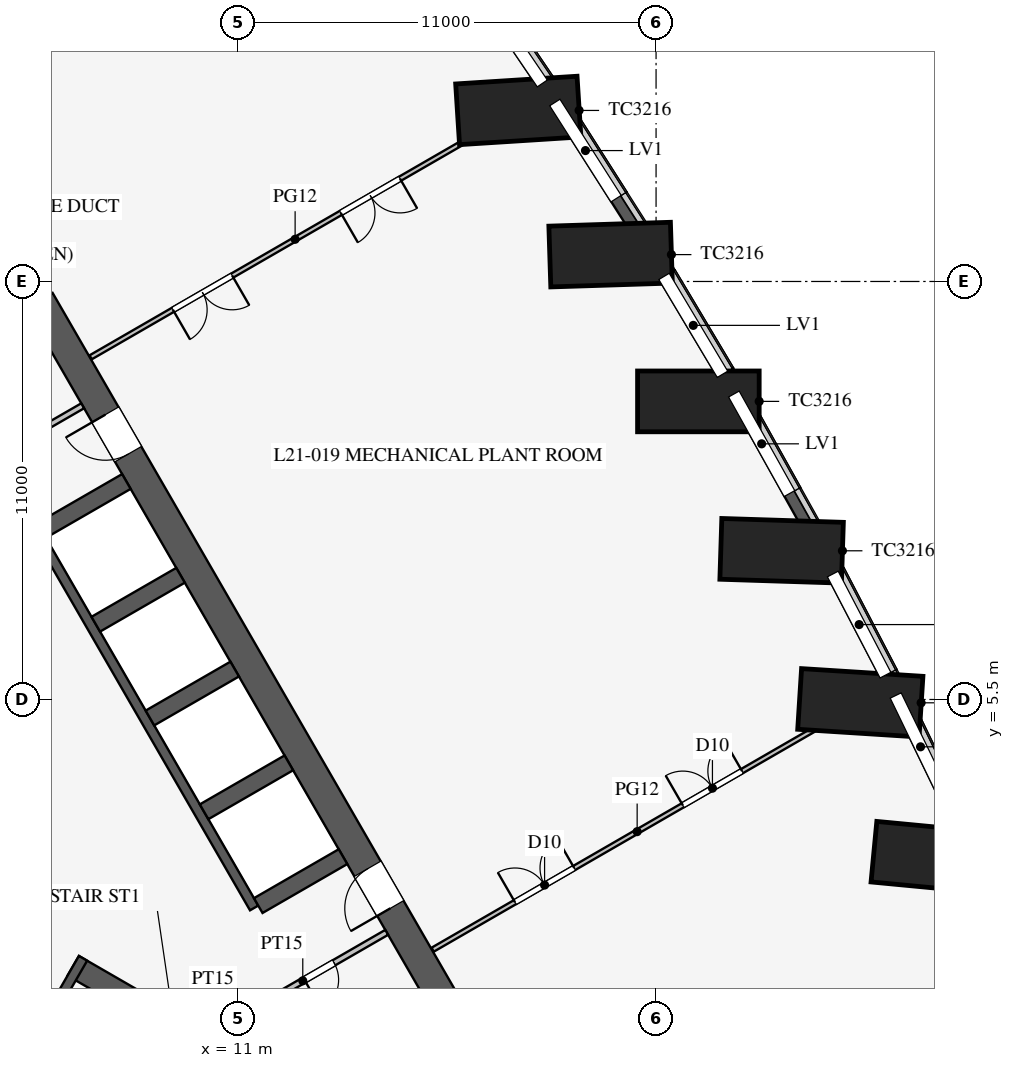
"""IFC4 building model, lengths in metres.
Left out: names, types, materials, properties, quantities, classifications, styles, units other than length and angle.
Written with IfcOpenShell. Run it as: python <this file> out.ifc"""

import sys

from ifc_helpers import new_model, si_unit, direction, frame, frame_2d, origin, origin_2d, place, context, subcontext, project, spatial, polyline, rectangle, outline, extrude, clip, halfspace, element, fill, save


model = new_model("IFC4")
c1 = context("Model", 3, precision=1e-05, world=origin(), true_north=direction((0.0, 1.0)))
c2 = subcontext(c1, "Body", "Model", "MODEL_VIEW")
j1 = project(units=[si_unit("LENGTHUNIT", "METRE"), si_unit("PLANEANGLEUNIT", "RADIAN")], contexts=[c1])
p1 = place(None, origin())
s1 = spatial("IfcSite", under=j1, at=p1, CompositionType="ELEMENT")
p2 = place(p1, origin())
s2 = spatial("IfcBuilding", under=s1, at=p2, CompositionType="ELEMENT")
p3 = place(p2, frame((0.0, 0.0, 92.1)))
s3 = spatial("IfcBuildingStorey", under=s2, at=p3, CompositionType="ELEMENT", Elevation=92.1)
p4 = place(p3, frame((31.426, -2.641, 0.0), z_axis=(-0.217636836674, -0.125674836379, 0.967904976133), x_axis=(-0.390430392584, 0.920087338943, 0.031676446499)))
e1 = element("IfcColumn", 1, at=p4, inside=s3, PredefinedType="COLUMN", context=c2, shape_type="Clipping", body=[
    clip(clip(extrude(rectangle(XDim=3.2, YDim=1.6, at=origin_2d()), origin(), (0.0, 0.0, 1.0), 6.199), halfspace(frame((0.0, 0.0, 0.259), z_axis=(1.6119245002534085e-05, 2.5335897412520618e-05, 0.9999999995491311), x_axis=(0.0, 0.9999999996790462, -2.5335897415812134e-05)), True)), halfspace(frame((0.0, 0.0, 5.939), z_axis=(-1.6119245002534085e-05, -2.5335897412520618e-05, -0.9999999995491311), x_axis=(0.0, -0.9999999996790462, 2.5335897415812134e-05)), True)),
])
p5 = place(p3, frame((29.576, 1.487, 0.0), z_axis=(-0.20262976704, -0.116980910023, 0.972243099332), x_axis=(-0.417791222298, 0.908271551682, 0.022209974679)))
e2 = element("IfcColumn", 2, at=p5, inside=s3, PredefinedType="COLUMN", context=c2, shape_type="Clipping", body=[
    clip(clip(extrude(rectangle(XDim=3.2, YDim=1.6, at=origin_2d()), origin(), (0.0, 0.0, 1.0), 6.171), halfspace(frame((0.0, 0.0, 0.229), z_axis=(-6.181182433073058e-06, -3.065069579338831e-06, 0.9999999999761991), x_axis=(0.0, 0.9999999999953028, 3.0650695793973846e-06)), True)), halfspace(frame((0.0, 0.0, 5.942), z_axis=(6.181182433073058e-06, 3.065069579338831e-06, -0.9999999999761991), x_axis=(0.0, -0.9999999999953028, -3.0650695793973846e-06)), True)),
])
p6 = place(p3, frame((27.611, 5.549, 0.0), z_axis=(-0.191886340443, -0.110783015409, 0.975144479474), x_axis=(-0.445390477365, 0.895226011395, 0.014060981253)))
e3 = element("IfcColumn", 3, at=p6, inside=s3, PredefinedType="COLUMN", context=c2, shape_type="Clipping", body=[
    clip(clip(extrude(rectangle(XDim=3.2, YDim=1.6, at=origin_2d()), origin(), (0.0, 0.0, 1.0), 6.153), halfspace(frame((0.0, 0.0, 0.205), z_axis=(-8.069350751413462e-07, -2.2984768012629386e-05, 0.9999999997355247), x_axis=(0.0, 0.9999999997358503, 2.298476801263687e-05)), True)), halfspace(frame((0.0, 0.0, 5.947), z_axis=(8.069350751413462e-07, 2.2984768012629386e-05, -0.9999999997355247), x_axis=(0.0, -0.9999999997358503, -2.298476801263687e-05)), True)),
])
p7 = place(p3, frame((25.531, 9.544, 0.0), z_axis=(-0.185417945913, -0.107037626655, 0.976812741427), x_axis=(-0.472814137091, 0.881135911226, 0.006804242326)))
e4 = element("IfcColumn", 4, at=p7, inside=s3, PredefinedType="COLUMN", context=c2, shape_type="Clipping", body=[
    clip(clip(extrude(rectangle(XDim=3.2, YDim=1.6, at=origin_2d()), origin(), (0.0, 0.0, 1.0), 6.142), halfspace(frame((0.0, 0.0, 0.187), z_axis=(-1.1482898320344485e-05, -6.019683504304707e-06, 0.9999999999159532), x_axis=(0.0, 0.9999999999818817, 6.019683504701576e-06)), True)), halfspace(frame((0.0, 0.0, 5.955), z_axis=(1.1482898320344485e-05, 6.019683504304707e-06, -0.9999999999159532), x_axis=(0.0, -0.9999999999818817, -6.019683504701576e-06)), True)),
])
p8 = place(p3, frame((23.338, 13.474, 0.0), z_axis=(-0.183254498096, -0.105784931626, 0.977357323177), x_axis=(-0.499939380126, 0.866060399857, 0.0)))
e5 = element("IfcColumn", 5, at=p8, inside=s3, PredefinedType="COLUMN", context=c2, shape_type="Clipping", body=[
    clip(clip(extrude(rectangle(XDim=3.2, YDim=1.6, at=origin_2d()), origin(), (0.0, 0.0, 1.0), 6.139), halfspace(frame((0.0, 0.0, 0.174), z_axis=(-1.4810932677108633e-05, 8.35661905923546e-06, 0.9999999998554017), x_axis=(0.0, 0.9999999999650835, -8.356619060152029e-06)), True)), halfspace(frame((0.0, 0.0, 5.965), z_axis=(1.4810932677108633e-05, -8.35661905923546e-06, -0.9999999998554017), x_axis=(0.0, -0.9999999999650835, 8.356619060152029e-06)), True)),
])
p9 = place(p3, frame((21.031, 17.339, 0.0), z_axis=(-0.185417945913, -0.107037626655, 0.976812741427), x_axis=(-0.526586350374, 0.850094417042, -0.006804242326)))
e6 = element("IfcColumn", 6, at=p9, inside=s3, PredefinedType="COLUMN", context=c2, shape_type="Clipping", body=[
    clip(clip(extrude(rectangle(XDim=3.2, YDim=1.6, at=origin_2d()), origin(), (0.0, 0.0, 1.0), 6.142), halfspace(frame((0.0, 0.0, 0.187), z_axis=(-1.1842135642686942e-05, -5.278007838949161e-06, 0.9999999999159532), x_axis=(0.0, 0.9999999999860714, 5.278007839319245e-06)), True)), halfspace(frame((0.0, 0.0, 5.955), z_axis=(1.1842135642686942e-05, 5.278007838949161e-06, -0.9999999999159532), x_axis=(0.0, -0.9999999999860714, -5.278007839319245e-06)), True)),
])
p10 = place(p3, frame((18.611, 21.137, 0.0), z_axis=(-0.191886340443, -0.110783015409, 0.975144479474), x_axis=(-0.552576194945, 0.833343769153, -0.014060981253)))
e7 = element("IfcColumn", 7, at=p10, inside=s3, PredefinedType="COLUMN", context=c2, shape_type="Clipping", body=[
    clip(clip(extrude(rectangle(XDim=3.2, YDim=1.6, at=origin_2d()), origin(), (0.0, 0.0, 1.0), 6.153), halfspace(frame((0.0, 0.0, 0.205), z_axis=(-3.711813696356814e-06, -2.269742593100088e-05, 0.9999999997355247), x_axis=(0.0, 0.9999999997424135, 2.269742593115724e-05)), True)), halfspace(frame((0.0, 0.0, 5.947), z_axis=(3.711813696356814e-06, 2.269742593100088e-05, -0.9999999997355247), x_axis=(0.0, -0.9999999997424135, -2.269742593115724e-05)), True)),
])
p11 = place(p3, frame((16.076, 24.87, 0.0), z_axis=(-0.20262976704, -0.116980910023, 0.972243099332), x_axis=(-0.577645682079, 0.81598540612, -0.022209974679)))
e8 = element("IfcColumn", 8, at=p11, inside=s3, PredefinedType="COLUMN", context=c2, shape_type="Clipping", body=[
    clip(clip(extrude(rectangle(XDim=3.2, YDim=1.6, at=origin_2d()), origin(), (0.0, 0.0, 1.0), 6.171), halfspace(frame((0.0, 0.0, 0.229), z_axis=(-6.6490654311614225e-06, -1.841628814169827e-06, 0.9999999999761991), x_axis=(0.0, 0.9999999999983042, 1.8416288142105364e-06)), True)), halfspace(frame((0.0, 0.0, 5.942), z_axis=(6.6490654311614225e-06, 1.841628814169827e-06, -0.9999999999761991), x_axis=(0.0, -0.9999999999983042, -1.8416288142105364e-06)), True)),
])
p12 = place(p3, frame((16.743, -3.0, 0.0), z_axis=(0.0, 0.0, 1.0), x_axis=(-0.500002442456, 0.866023993627, 0.0)))
e9 = element("IfcWall", 9, at=p12, inside=s3, PredefinedType="SHEAR", context=c2, shape_type="SweptSolid", body=[
    extrude(rectangle(XDim=21.939, YDim=0.8, at=frame_2d((10.97, 0.0))), origin(), (0.0, 0.0, 1.0), 6.0),
])
p13 = place(p12, frame((17.27, 0.0, 0.0)))
e10 = element("IfcOpeningElement", 10, at=p13, cuts=e9, PredefinedType="OPENING", context=c2, shape_type="SweptSolid", body=[
    extrude(rectangle(XDim=1.2, YDim=2.1, at=frame_2d((0.6, 1.05))), frame((0.0, 0.41, 0.0), z_axis=(0.0, -1.0, 0.0), x_axis=(1.0, 0.0, 0.0)), (0.0, 0.0, 1.0), 0.82),
])
p14 = place(p12, frame((3.47, 0.0, 0.0)))
e11 = element("IfcOpeningElement", 11, at=p14, cuts=e9, PredefinedType="OPENING", context=c2, shape_type="SweptSolid", body=[
    extrude(rectangle(XDim=1.2, YDim=2.1, at=frame_2d((0.6, 1.05))), frame((0.0, 0.41, 0.0), z_axis=(0.0, -1.0, 0.0), x_axis=(1.0, 0.0, 0.0)), (0.0, 0.0, 1.0), 0.82),
])
p15 = place(p3, frame((11.424, 0.014, 0.0), z_axis=(0.0, 0.0, 1.0), x_axis=(-0.500001763848, 0.866024385424, 0.0)))
e12 = element("IfcWall", 12, at=p15, inside=s3, PredefinedType="SHEAR", context=c2, shape_type="SweptSolid", body=[
    extrude(rectangle(XDim=11.4, YDim=0.25, at=frame_2d((5.7, 0.0))), origin(), (0.0, 0.0, 1.0), 6.0),
])
for number, where, z_axis, x_axis in (
    (13, (11.532, 0.076, 0.0), (0.0, 0.0, 1.0), (0.866, 0.5, 0.0)),
    (14, (10.107, 2.544, 0.0), (0.0, 0.0, 1.0), (0.866, 0.5, 0.0)),
    (15, (8.682, 5.012, 0.0), (0.0, 0.0, 1.0), (0.866, 0.5, 0.0)),
    (16, (7.257, 7.481, 0.0), (0.0, 0.0, 1.0), (0.866, 0.5, 0.0)),
):
    element("IfcWall", number, at=place(p3, frame(where, z_axis=z_axis, x_axis=x_axis)), inside=s3, PredefinedType="SHEAR", context=c2, shape_type="SweptSolid", body=[
        extrude(rectangle(XDim=2.575, YDim=0.45, at=frame_2d((1.288, 0.0))), origin(), (0.0, 0.0, 1.0), 6.0),
    ])
p16 = place(p3, frame((5.832, 9.949, 0.0), z_axis=(0.0, 0.0, 1.0), x_axis=(0.866029291668, 0.499993265928, 0.0)))
e17 = element("IfcWall", 17, at=p16, inside=s3, PredefinedType="SHEAR", context=c2, shape_type="SweptSolid", body=[
    extrude(rectangle(XDim=2.575, YDim=0.45, at=frame_2d((1.288, 0.0))), origin(), (0.0, 0.0, 1.0), 6.0),
])
p17 = place(p3, frame((6.663, -1.509, 0.0), z_axis=(0.0, 0.0, 1.0), x_axis=(0.866019375473, -0.500010441196, 0.0)))
e18 = element("IfcWall", 18, at=p17, inside=s3, PredefinedType="SHEAR", context=c2, shape_type="SweptSolid", body=[
    extrude(rectangle(XDim=9.075, YDim=0.6, at=frame_2d((4.538, 0.0))), origin(), (0.0, 0.0, 1.0), 6.0),
])
p18 = place(p3, frame((4.597, -5.339, 0.0), z_axis=(0.0, 0.0, 1.0), x_axis=(0.499984536904, 0.866034331223, 0.0)))
e19 = element("IfcWall", 19, at=p18, inside=s3, PredefinedType="SHEAR", context=c2, shape_type="SweptSolid", body=[
    extrude(rectangle(XDim=4.65, YDim=0.25, at=frame_2d((2.325, 0.0))), origin(), (0.0, 0.0, 1.0), 6.0),
])
p19 = place(p18, frame((1.525, 0.0, 0.0)))
e20 = element("IfcOpeningElement", 20, at=p19, cuts=e19, PredefinedType="OPENING", context=c2, shape_type="SweptSolid", body=[
    extrude(rectangle(XDim=1.6, YDim=2.1, at=frame_2d((0.8, 1.05))), frame((0.0, 0.135, 0.0), z_axis=(0.0, -1.0, 0.0), x_axis=(1.0, 0.0, 0.0)), (0.0, 0.0, 1.0), 0.27),
])
p20 = place(p3, frame((30.141, 1.814, 0.0), z_axis=(0.0, 0.0, 1.0), x_axis=(-0.435857917556, 0.900015486369, 0.0)))
e21 = element("IfcWall", 21, at=p20, inside=s3, PredefinedType="SOLIDWALL", context=c2, shape_type="SweptSolid", body=[
    extrude(rectangle(XDim=4.512, YDim=0.3, at=frame_2d((2.256, 0.0))), origin(), (0.0, 0.0, 1.0), 5.8),
])
p21 = place(p20, frame((1.212, 0.0, 3.5)))
e22 = element("IfcOpeningElement", 22, at=p21, cuts=e21, PredefinedType="OPENING", context=c2, shape_type="SweptSolid", body=[
    extrude(rectangle(XDim=3.0, YDim=2.0, at=frame_2d((1.5, 1.0))), frame((0.0, 0.16, 0.0), z_axis=(0.0, -1.0, 0.0), x_axis=(1.0, 0.0, 0.0)), (0.0, 0.0, 1.0), 0.32),
])
p22 = place(p3, frame((28.175, 5.875, 0.0), z_axis=(0.0, 0.0, 1.0), x_axis=(-0.461810056307, 0.886978845235, 0.0)))
e23 = element("IfcWall", 23, at=p22, inside=s3, PredefinedType="SOLIDWALL", context=c2, shape_type="SweptSolid", body=[
    extrude(rectangle(XDim=4.504, YDim=0.3, at=frame_2d((2.252, 0.0))), origin(), (0.0, 0.0, 1.0), 5.8),
])
p23 = place(p22, frame((0.3, 0.0, 3.5)))
e24 = element("IfcOpeningElement", 24, at=p23, cuts=e23, PredefinedType="OPENING", context=c2, shape_type="SweptSolid", body=[
    extrude(rectangle(XDim=3.0, YDim=2.0, at=frame_2d((1.5, 1.0))), frame((0.0, 0.16, 0.0), z_axis=(0.0, -1.0, 0.0), x_axis=(1.0, 0.0, 0.0)), (0.0, 0.0, 1.0), 0.32),
])
p24 = place(p3, frame((26.095, 9.87, 0.0), z_axis=(0.0, 0.0, 1.0), x_axis=(-0.487415216275, 0.87317031955, 0.0)))
e25 = element("IfcWall", 25, at=p24, inside=s3, PredefinedType="SOLIDWALL", context=c2, shape_type="SweptSolid", body=[
    extrude(rectangle(XDim=4.5, YDim=0.3, at=frame_2d((2.25, 0.0))), origin(), (0.0, 0.0, 1.0), 5.8),
])
p25 = place(p24, frame((1.2, 0.0, 3.5)))
e26 = element("IfcOpeningElement", 26, at=p25, cuts=e25, PredefinedType="OPENING", context=c2, shape_type="SweptSolid", body=[
    extrude(rectangle(XDim=3.0, YDim=2.0, at=frame_2d((1.5, 1.0))), frame((0.0, 0.16, 0.0), z_axis=(0.0, -1.0, 0.0), x_axis=(1.0, 0.0, 0.0)), (0.0, 0.0, 1.0), 0.32),
])
p26 = place(p3, frame((23.901, 13.799, 0.0), z_axis=(0.0, 0.0, 1.0), x_axis=(-0.512483962191, 0.858696796604, 0.0)))
e27 = element("IfcWall", 27, at=p26, inside=s3, PredefinedType="SOLIDWALL", context=c2, shape_type="SweptSolid", body=[
    extrude(rectangle(XDim=4.5, YDim=0.3, at=frame_2d((2.25, 0.0))), origin(), (0.0, 0.0, 1.0), 5.8),
])
p27 = place(p26, frame((0.3, 0.0, 3.5)))
e28 = element("IfcOpeningElement", 28, at=p27, cuts=e27, PredefinedType="OPENING", context=c2, shape_type="SweptSolid", body=[
    extrude(rectangle(XDim=3.0, YDim=2.0, at=frame_2d((1.5, 1.0))), frame((0.0, 0.16, 0.0), z_axis=(0.0, -1.0, 0.0), x_axis=(1.0, 0.0, 0.0)), (0.0, 0.0, 1.0), 0.32),
])
p28 = place(p3, frame((21.595, 17.664, 0.0), z_axis=(0.0, 0.0, 1.0), x_axis=(-0.537243691336, 0.843427066272, 0.0)))
e29 = element("IfcWall", 29, at=p28, inside=s3, PredefinedType="SOLIDWALL", context=c2, shape_type="SweptSolid", body=[
    extrude(rectangle(XDim=4.504, YDim=0.3, at=frame_2d((2.252, 0.0))), origin(), (0.0, 0.0, 1.0), 5.8),
])
p29 = place(p28, frame((1.204, 0.0, 3.5)))
e30 = element("IfcOpeningElement", 30, at=p29, cuts=e29, PredefinedType="OPENING", context=c2, shape_type="SweptSolid", body=[
    extrude(rectangle(XDim=3.0, YDim=2.0, at=frame_2d((1.5, 1.0))), frame((0.0, 0.16, 0.0), z_axis=(0.0, -1.0, 0.0), x_axis=(1.0, 0.0, 0.0)), (0.0, 0.0, 1.0), 0.32),
])
p30 = place(p3, frame((19.175, 21.463, 0.0), z_axis=(0.0, 0.0, 1.0), x_axis=(-0.561512004239, 0.827468591002, 0.0)))
e31 = element("IfcWall", 31, at=p30, inside=s3, PredefinedType="SOLIDWALL", context=c2, shape_type="SweptSolid", body=[
    extrude(rectangle(XDim=4.512, YDim=0.3, at=frame_2d((2.256, 0.0))), origin(), (0.0, 0.0, 1.0), 5.8),
])
p31 = place(p30, frame((0.3, 0.0, 3.5)))
e32 = element("IfcOpeningElement", 32, at=p31, cuts=e31, PredefinedType="OPENING", context=c2, shape_type="SweptSolid", body=[
    extrude(rectangle(XDim=3.0, YDim=2.0, at=frame_2d((1.5, 1.0))), frame((0.0, 0.16, 0.0), z_axis=(0.0, -1.0, 0.0), x_axis=(1.0, 0.0, 0.0)), (0.0, 0.0, 1.0), 0.32),
])
p32 = place(p3, frame((2.495, 10.678, 0.0), z_axis=(0.0, 0.0, 1.0), x_axis=(0.86602216432, 0.500005610874, 0.0)))
e33 = element("IfcWall", 33, at=p32, inside=s3, PredefinedType="PARTITIONING", context=c2, shape_type="SweptSolid", body=[
    extrude(rectangle(XDim=5.1, YDim=0.15, at=frame_2d((2.55, 0.0))), origin(), (0.0, 0.0, 1.0), 5.8),
])
p33 = place(p32, frame((1.3, 0.0, 0.0)))
e34 = element("IfcOpeningElement", 34, at=p33, cuts=e33, PredefinedType="OPENING", context=c2, shape_type="SweptSolid", body=[
    extrude(rectangle(XDim=0.9, YDim=2.1, at=frame_2d((0.45, 1.05))), frame((0.0, 0.085, 0.0), z_axis=(0.0, -1.0, 0.0), x_axis=(1.0, 0.0, 0.0)), (0.0, 0.0, 1.0), 0.17),
])
p34 = place(p3, frame((10.495, -3.178, 0.0), z_axis=(0.0, 0.0, 1.0), x_axis=(0.86602216432, 0.500005610874, 0.0)))
e35 = element("IfcWall", 35, at=p34, inside=s3, PredefinedType="PARTITIONING", context=c2, shape_type="SweptSolid", body=[
    extrude(rectangle(XDim=5.1, YDim=0.15, at=frame_2d((2.55, 0.0))), origin(), (0.0, 0.0, 1.0), 5.8),
])
p35 = place(p34, frame((2.6, 0.0, 0.0)))
e36 = element("IfcOpeningElement", 36, at=p35, cuts=e35, PredefinedType="OPENING", context=c2, shape_type="SweptSolid", body=[
    extrude(rectangle(XDim=0.9, YDim=2.1, at=frame_2d((0.45, 1.05))), frame((0.0, 0.085, 0.0), z_axis=(0.0, -1.0, 0.0), x_axis=(1.0, 0.0, 0.0)), (0.0, 0.0, 1.0), 0.17),
])
p36 = place(p3, frame((17.316, 20.39, 0.0), z_axis=(0.0, 0.0, 1.0), x_axis=(0.865911816314, 0.500196687681, 0.0)))
e37 = element("IfcWall", 37, at=p36, inside=s3, PredefinedType="PARTITIONING", context=c2, shape_type="SweptSolid", body=[
    extrude(outline(polyline([(0.0, 0.0), (0.654, 0.0), (0.653, 0.05), (0.0, 2.9), (0.0, 0.0)])), frame((0.0, 0.06, 0.0), z_axis=(0.0, -1.0, 0.0), x_axis=(1.0, 0.0, 0.0)), (0.0, 0.0, 1.0), 0.12),
])
p37 = place(p3, frame((26.316, 4.802, 0.0), z_axis=(0.0, 0.0, 1.0), x_axis=(0.866073599808, 0.499916512745, 0.0)))
e38 = element("IfcWall", 38, at=p37, inside=s3, PredefinedType="PARTITIONING", context=c2, shape_type="SweptSolid", body=[
    extrude(outline(polyline([(0.0, 0.0), (0.653, 0.0), (0.653, 0.05), (0.0, 2.9), (0.0, 0.0)])), frame((0.0, 0.06, 0.0), z_axis=(0.0, -1.0, 0.0), x_axis=(1.0, 0.0, 0.0)), (0.0, 0.0, 1.0), 0.12),
])
p38 = place(p3, frame((7.122, 14.504, 0.0), z_axis=(0.0, 0.0, 1.0), x_axis=(0.866023947468, 0.500002522405, 0.0)))
e39 = element("IfcWall", 39, at=p38, inside=s3, PredefinedType="PARTITIONING", context=c2, shape_type="SweptSolid", body=[
    extrude(rectangle(XDim=11.771, YDim=0.12, at=frame_2d((5.886, 0.0))), origin(), (0.0, 0.0, 1.0), 2.9),
])
p39 = place(p38, frame((2.5, 0.0, 0.0)))
e40 = element("IfcOpeningElement", 40, at=p39, cuts=e39, PredefinedType="OPENING", context=c2, shape_type="SweptSolid", body=[
    extrude(rectangle(XDim=1.8, YDim=2.1, at=frame_2d((0.9, 1.05))), frame((0.0, 0.07, 0.0), z_axis=(0.0, -1.0, 0.0), x_axis=(1.0, 0.0, 0.0)), (0.0, 0.0, 1.0), 0.14),
])
p40 = place(p38, frame((7.6, 0.0, 0.0)))
e41 = element("IfcOpeningElement", 41, at=p40, cuts=e39, PredefinedType="OPENING", context=c2, shape_type="SweptSolid", body=[
    extrude(rectangle(XDim=1.8, YDim=2.1, at=frame_2d((0.9, 1.05))), frame((0.0, 0.07, 0.0), z_axis=(0.0, -1.0, 0.0), x_axis=(1.0, 0.0, 0.0)), (0.0, 0.0, 1.0), 0.14),
])
p41 = place(p3, frame((16.122, -1.084, 0.0), z_axis=(0.0, 0.0, 1.0), x_axis=(0.866023947468, 0.500002522405, 0.0)))
e42 = element("IfcWall", 42, at=p41, inside=s3, PredefinedType="PARTITIONING", context=c2, shape_type="SweptSolid", body=[
    extrude(rectangle(XDim=11.771, YDim=0.12, at=frame_2d((5.886, 0.0))), origin(), (0.0, 0.0, 1.0), 2.9),
])
p42 = place(p41, frame((2.5, 0.0, 0.0)))
e43 = element("IfcOpeningElement", 43, at=p42, cuts=e42, PredefinedType="OPENING", context=c2, shape_type="SweptSolid", body=[
    extrude(rectangle(XDim=1.8, YDim=2.1, at=frame_2d((0.9, 1.05))), frame((0.0, 0.07, 0.0), z_axis=(0.0, -1.0, 0.0), x_axis=(1.0, 0.0, 0.0)), (0.0, 0.0, 1.0), 0.14),
])
p43 = place(p41, frame((7.6, 0.0, 0.0)))
e44 = element("IfcOpeningElement", 44, at=p43, cuts=e42, PredefinedType="OPENING", context=c2, shape_type="SweptSolid", body=[
    extrude(rectangle(XDim=1.8, YDim=2.1, at=frame_2d((0.9, 1.05))), frame((0.0, 0.07, 0.0), z_axis=(0.0, -1.0, 0.0), x_axis=(1.0, 0.0, 0.0)), (0.0, 0.0, 1.0), 0.14),
])
p44 = place(p21, origin())
e45 = element("IfcWindow", 45, at=p44, inside=s3, PartitioningType="SINGLE_PANEL", PredefinedType="USERDEFINED", context=c2, shape_type="SweptSolid", body=[
    extrude(rectangle(XDim=3.0, YDim=2.0, at=frame_2d((1.5, 1.0))), frame((0.0, 0.03, 0.0), z_axis=(0.0, -1.0, 0.0), x_axis=(1.0, 0.0, 0.0)), (0.0, 0.0, 1.0), 0.06),
])
fill(e22, e45)
p45 = place(p23, origin())
e46 = element("IfcWindow", 46, at=p45, inside=s3, PartitioningType="SINGLE_PANEL", PredefinedType="USERDEFINED", context=c2, shape_type="SweptSolid", body=[
    extrude(rectangle(XDim=3.0, YDim=2.0, at=frame_2d((1.5, 1.0))), frame((0.0, 0.03, 0.0), z_axis=(0.0, -1.0, 0.0), x_axis=(1.0, 0.0, 0.0)), (0.0, 0.0, 1.0), 0.06),
])
fill(e24, e46)
p46 = place(p25, origin())
e47 = element("IfcWindow", 47, at=p46, inside=s3, PartitioningType="SINGLE_PANEL", PredefinedType="USERDEFINED", context=c2, shape_type="SweptSolid", body=[
    extrude(rectangle(XDim=3.0, YDim=2.0, at=frame_2d((1.5, 1.0))), frame((0.0, 0.03, 0.0), z_axis=(0.0, -1.0, 0.0), x_axis=(1.0, 0.0, 0.0)), (0.0, 0.0, 1.0), 0.06),
])
fill(e26, e47)
p47 = place(p27, origin())
e48 = element("IfcWindow", 48, at=p47, inside=s3, PartitioningType="SINGLE_PANEL", PredefinedType="USERDEFINED", context=c2, shape_type="SweptSolid", body=[
    extrude(rectangle(XDim=3.0, YDim=2.0, at=frame_2d((1.5, 1.0))), frame((0.0, 0.03, 0.0), z_axis=(0.0, -1.0, 0.0), x_axis=(1.0, 0.0, 0.0)), (0.0, 0.0, 1.0), 0.06),
])
fill(e28, e48)
p48 = place(p29, origin())
e49 = element("IfcWindow", 49, at=p48, inside=s3, PartitioningType="SINGLE_PANEL", PredefinedType="USERDEFINED", context=c2, shape_type="SweptSolid", body=[
    extrude(rectangle(XDim=3.0, YDim=2.0, at=frame_2d((1.5, 1.0))), frame((0.0, 0.03, 0.0), z_axis=(0.0, -1.0, 0.0), x_axis=(1.0, 0.0, 0.0)), (0.0, 0.0, 1.0), 0.06),
])
fill(e30, e49)
p49 = place(p31, origin())
e50 = element("IfcWindow", 50, at=p49, inside=s3, PartitioningType="SINGLE_PANEL", PredefinedType="USERDEFINED", context=c2, shape_type="SweptSolid", body=[
    extrude(rectangle(XDim=3.0, YDim=2.0, at=frame_2d((1.5, 1.0))), frame((0.0, 0.03, 0.0), z_axis=(0.0, -1.0, 0.0), x_axis=(1.0, 0.0, 0.0)), (0.0, 0.0, 1.0), 0.06),
])
fill(e32, e50)
p50 = place(p35, frame((0.9, 0.0, 0.0), z_axis=(0.0, 0.0, 1.0), x_axis=(-1.0, 0.0, 0.0)))
e51 = element("IfcDoor", 51, at=p50, inside=s3, OperationType="SINGLE_SWING_RIGHT", PredefinedType="DOOR", context=c2, shape_type="SweptSolid", body=[
    extrude(rectangle(XDim=0.9, YDim=2.1, at=frame_2d((0.45, 1.05))), frame((0.0, 0.025, 0.0), z_axis=(0.0, -1.0, 0.0), x_axis=(1.0, 0.0, 0.0)), (0.0, 0.0, 1.0), 0.05),
])
fill(e36, e51)
p51 = place(p13, origin())
e52 = element("IfcDoor", 52, at=p51, inside=s3, OperationType="SINGLE_SWING_RIGHT", PredefinedType="DOOR", context=c2, shape_type="SweptSolid", body=[
    extrude(rectangle(XDim=1.2, YDim=2.1, at=frame_2d((0.6, 1.05))), frame((0.0, 0.025, 0.0), z_axis=(0.0, -1.0, 0.0), x_axis=(1.0, 0.0, 0.0)), (0.0, 0.0, 1.0), 0.05),
])
fill(e10, e52)
p52 = place(p14, origin())
e53 = element("IfcDoor", 53, at=p52, inside=s3, OperationType="SINGLE_SWING_LEFT", PredefinedType="DOOR", context=c2, shape_type="SweptSolid", body=[
    extrude(rectangle(XDim=1.2, YDim=2.1, at=frame_2d((0.6, 1.05))), frame((0.0, 0.025, 0.0), z_axis=(0.0, -1.0, 0.0), x_axis=(1.0, 0.0, 0.0)), (0.0, 0.0, 1.0), 0.05),
])
fill(e11, e53)
p53 = place(p39, frame((1.8, 0.0, 0.0), z_axis=(0.0, 0.0, 1.0), x_axis=(-1.0, 0.0, 0.0)))
e54 = element("IfcDoor", 54, at=p53, inside=s3, OperationType="DOUBLE_DOOR_SINGLE_SWING", PredefinedType="DOOR", context=c2, shape_type="SweptSolid", body=[
    extrude(rectangle(XDim=1.8, YDim=2.1, at=frame_2d((0.9, 1.05))), frame((0.0, 0.025, 0.0), z_axis=(0.0, -1.0, 0.0), x_axis=(1.0, 0.0, 0.0)), (0.0, 0.0, 1.0), 0.05),
])
fill(e40, e54)
p54 = place(p40, frame((1.8, 0.0, 0.0), z_axis=(0.0, 0.0, 1.0), x_axis=(-1.0, 0.0, 0.0)))
e55 = element("IfcDoor", 55, at=p54, inside=s3, OperationType="DOUBLE_DOOR_SINGLE_SWING", PredefinedType="DOOR", context=c2, shape_type="SweptSolid", body=[
    extrude(rectangle(XDim=1.8, YDim=2.1, at=frame_2d((0.9, 1.05))), frame((0.0, 0.025, 0.0), z_axis=(0.0, -1.0, 0.0), x_axis=(1.0, 0.0, 0.0)), (0.0, 0.0, 1.0), 0.05),
])
fill(e41, e55)
p55 = place(p42, origin())
e56 = element("IfcDoor", 56, at=p55, inside=s3, OperationType="DOUBLE_DOOR_SINGLE_SWING", PredefinedType="DOOR", context=c2, shape_type="SweptSolid", body=[
    extrude(rectangle(XDim=1.8, YDim=2.1, at=frame_2d((0.9, 1.05))), frame((0.0, 0.025, 0.0), z_axis=(0.0, -1.0, 0.0), x_axis=(1.0, 0.0, 0.0)), (0.0, 0.0, 1.0), 0.05),
])
fill(e43, e56)
p56 = place(p43, origin())
e57 = element("IfcDoor", 57, at=p56, inside=s3, OperationType="DOUBLE_DOOR_SINGLE_SWING", PredefinedType="DOOR", context=c2, shape_type="SweptSolid", body=[
    extrude(rectangle(XDim=1.8, YDim=2.1, at=frame_2d((0.9, 1.05))), frame((0.0, 0.025, 0.0), z_axis=(0.0, -1.0, 0.0), x_axis=(1.0, 0.0, 0.0)), (0.0, 0.0, 1.0), 0.05),
])
fill(e44, e57)
save(model, sys.argv[1])
